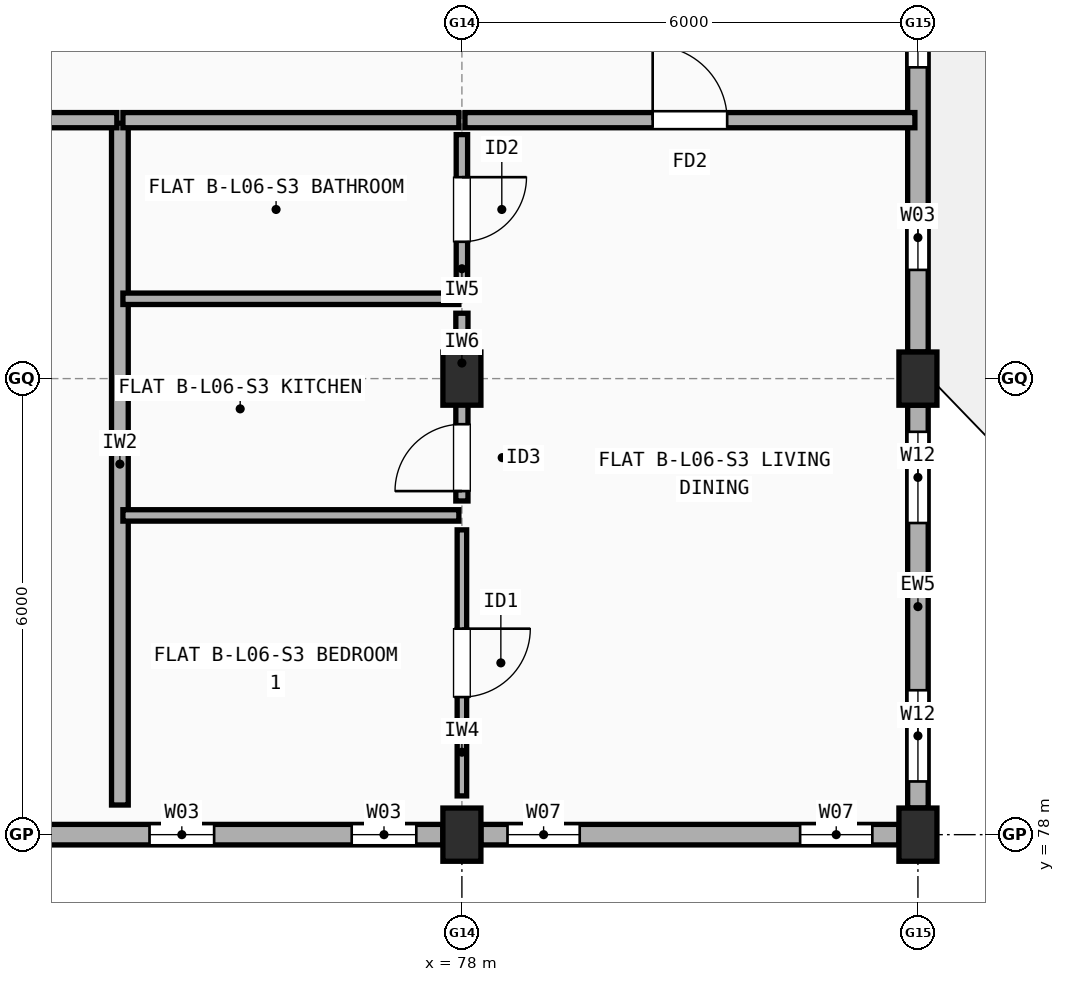
"""IFC4 building model, lengths in metres.
Left out: names, types, materials, properties, quantities, classifications, styles, units other than length and angle.
Written with IfcOpenShell. Run it as: python <this file> out.ifc"""

import sys

from ifc_helpers import new_model, si_unit, direction, frame, frame_2d, origin, origin_2d, place, context, subcontext, project, spatial, rectangle, extrude, element, fill, save


model = new_model("IFC4")
c1 = context("Model", 3, precision=1e-05, world=origin(), true_north=direction((0.0, 1.0)))
c2 = subcontext(c1, "Body", "Model", "MODEL_VIEW")
j1 = project(units=[si_unit("LENGTHUNIT", "METRE"), si_unit("PLANEANGLEUNIT", "RADIAN")], contexts=[c1])
p1 = place(None, origin())
s1 = spatial("IfcSite", under=j1, at=p1, CompositionType="ELEMENT")
p2 = place(p1, origin())
s2 = spatial("IfcBuilding", under=s1, at=p2, CompositionType="ELEMENT")
p3 = place(p2, frame((0.0, 0.0, 20.5)))
s3 = spatial("IfcBuildingStorey", under=s2, at=p3, CompositionType="ELEMENT", Elevation=20.5)
for number, where, z_axis, x_axis in (
    (1, (78.0, 78.0, 0.0), (0.0, 0.0, 1.0), (1.0, 0.0, 0.0)),
    (2, (78.0, 84.0, 0.0), (0.0, 0.0, 1.0), (1.0, 0.0, 0.0)),
    (3, (84.0, 78.0, 0.0), (0.0, 0.0, 1.0), (1.0, 0.0, 0.0)),
    (4, (84.0, 84.0, 0.0), (0.0, 0.0, 1.0), (1.0, 0.0, 0.0)),
):
    element("IfcColumn", number, at=place(p3, frame(where, z_axis=z_axis, x_axis=x_axis)), inside=s3, PredefinedType="COLUMN", context=c2, shape_type="SweptSolid", body=[
        extrude(rectangle(XDim=0.5, YDim=0.7, at=origin_2d()), origin(), (0.0, 0.0, 1.0), 2.97),
    ])
p4 = place(p3, frame((72.275, 78.0, 0.0), z_axis=(0.0, 0.0, 1.0), x_axis=(1.0, 0.0, 0.0)))
e5 = element("IfcWall", 5, at=p4, inside=s3, PredefinedType="STANDARD", context=c2, shape_type="SweptSolid", body=[
    extrude(rectangle(XDim=5.475, YDim=0.27, at=frame_2d((2.738, 0.0))), origin(), (0.0, 0.0, 1.0), 2.452),
])
p5 = place(p4, frame((1.615, 0.0, 0.9)))
e6 = element("IfcOpeningElement", 6, at=p5, cuts=e5, PredefinedType="OPENING", context=c2, shape_type="SweptSolid", body=[
    extrude(rectangle(XDim=0.85, YDim=1.25, at=frame_2d((0.425, 0.625))), frame((0.0, 0.145, 0.0), z_axis=(0.0, -1.0, 0.0), x_axis=(1.0, 0.0, 0.0)), (0.0, 0.0, 1.0), 0.29),
])
p6 = place(p4, frame((4.275, 0.0, 0.9)))
e7 = element("IfcOpeningElement", 7, at=p6, cuts=e5, PredefinedType="OPENING", context=c2, shape_type="SweptSolid", body=[
    extrude(rectangle(XDim=0.85, YDim=1.25, at=frame_2d((0.425, 0.625))), frame((0.0, 0.145, 0.0), z_axis=(0.0, -1.0, 0.0), x_axis=(1.0, 0.0, 0.0)), (0.0, 0.0, 1.0), 0.29),
])
p7 = place(p3, frame((78.25, 78.0, 0.0), z_axis=(0.0, 0.0, 1.0), x_axis=(1.0, 0.0, 0.0)))
e8 = element("IfcWall", 8, at=p7, inside=s3, PredefinedType="STANDARD", context=c2, shape_type="SweptSolid", body=[
    extrude(rectangle(XDim=5.5, YDim=0.27, at=frame_2d((2.75, 0.0))), origin(), (0.0, 0.0, 1.0), 2.452),
])
p8 = place(p7, frame((0.35, 0.0, 0.9)))
e9 = element("IfcOpeningElement", 9, at=p8, cuts=e8, PredefinedType="OPENING", context=c2, shape_type="SweptSolid", body=[
    extrude(rectangle(XDim=0.95, YDim=1.35, at=frame_2d((0.475, 0.675))), frame((0.0, 0.145, 0.0), z_axis=(0.0, -1.0, 0.0), x_axis=(1.0, 0.0, 0.0)), (0.0, 0.0, 1.0), 0.29),
])
p9 = place(p7, frame((4.2, 0.0, 0.9)))
e10 = element("IfcOpeningElement", 10, at=p9, cuts=e8, PredefinedType="OPENING", context=c2, shape_type="SweptSolid", body=[
    extrude(rectangle(XDim=0.95, YDim=1.35, at=frame_2d((0.475, 0.675))), frame((0.0, 0.145, 0.0), z_axis=(0.0, -1.0, 0.0), x_axis=(1.0, 0.0, 0.0)), (0.0, 0.0, 1.0), 0.29),
])
p10 = place(p3, frame((84.0, 78.35, 0.0), z_axis=(0.0, 0.0, 1.0), x_axis=(0.0, 1.0, 0.0)))
e11 = element("IfcWall", 11, at=p10, inside=s3, PredefinedType="STANDARD", context=c2, shape_type="SweptSolid", body=[
    extrude(rectangle(XDim=5.3, YDim=0.27, at=frame_2d((2.65, 0.0))), origin(), (0.0, 0.0, 1.0), 2.452),
])
p11 = place(p10, frame((0.35, 0.0, 0.9)))
e12 = element("IfcOpeningElement", 12, at=p11, cuts=e11, PredefinedType="OPENING", context=c2, shape_type="SweptSolid", body=[
    extrude(rectangle(XDim=1.2, YDim=1.35, at=frame_2d((0.6, 0.675))), frame((0.0, 0.145, 0.0), z_axis=(0.0, -1.0, 0.0), x_axis=(1.0, 0.0, 0.0)), (0.0, 0.0, 1.0), 0.29),
])
p12 = place(p10, frame((3.75, 0.0, 0.9)))
e13 = element("IfcOpeningElement", 13, at=p12, cuts=e11, PredefinedType="OPENING", context=c2, shape_type="SweptSolid", body=[
    extrude(rectangle(XDim=1.2, YDim=1.35, at=frame_2d((0.6, 0.675))), frame((0.0, 0.145, 0.0), z_axis=(0.0, -1.0, 0.0), x_axis=(1.0, 0.0, 0.0)), (0.0, 0.0, 1.0), 0.29),
])
p13 = place(p3, frame((84.0, 84.35, 0.0), z_axis=(0.0, 0.0, 1.0), x_axis=(0.0, 1.0, 0.0)))
e14 = element("IfcWall", 14, at=p13, inside=s3, PredefinedType="STANDARD", context=c2, shape_type="SweptSolid", body=[
    extrude(rectangle(XDim=5.3, YDim=0.27, at=frame_2d((2.65, 0.0))), origin(), (0.0, 0.0, 1.0), 2.452),
])
p14 = place(p13, frame((1.08, 0.0, 0.9)))
e15 = element("IfcOpeningElement", 15, at=p14, cuts=e14, PredefinedType="OPENING", context=c2, shape_type="SweptSolid", body=[
    extrude(rectangle(XDim=0.85, YDim=1.25, at=frame_2d((0.425, 0.625))), frame((0.0, 0.145, 0.0), z_axis=(0.0, -1.0, 0.0), x_axis=(1.0, 0.0, 0.0)), (0.0, 0.0, 1.0), 0.29),
])
p15 = place(p13, frame((3.745, 0.0, 0.9)))
e16 = element("IfcOpeningElement", 16, at=p15, cuts=e14, PredefinedType="OPENING", context=c2, shape_type="SweptSolid", body=[
    extrude(rectangle(XDim=0.9, YDim=1.3, at=frame_2d((0.45, 0.65))), frame((0.0, 0.145, 0.0), z_axis=(0.0, -1.0, 0.0), x_axis=(1.0, 0.0, 0.0)), (0.0, 0.0, 1.0), 0.29),
])
p16 = place(p3, frame((73.5, 78.39, 0.0), z_axis=(0.0, 0.0, 1.0), x_axis=(0.0, 1.0, 0.0)))
e17 = element("IfcWall", 17, at=p16, inside=s3, PredefinedType="SOLIDWALL", context=c2, shape_type="SweptSolid", body=[
    extrude(rectangle(XDim=8.97, YDim=0.22, at=frame_2d((4.485, 0.0))), origin(), (0.0, 0.0, 1.0), 2.452),
])
p17 = place(p3, frame((67.54, 87.4, 0.0), z_axis=(0.0, 0.0, 1.0), x_axis=(1.0, 0.0, 0.0)))
e18 = element("IfcWall", 18, at=p17, inside=s3, PredefinedType="SOLIDWALL", context=c2, shape_type="SweptSolid", body=[
    extrude(rectangle(XDim=5.92, YDim=0.2, at=frame_2d((2.96, 0.0))), origin(), (0.0, 0.0, 1.0), 2.548),
])
p18 = place(p17, frame((2.46, 0.0, 0.0)))
e19 = element("IfcOpeningElement", 19, at=p18, cuts=e18, PredefinedType="OPENING", context=c2, shape_type="SweptSolid", body=[
    extrude(rectangle(XDim=1.0, YDim=2.15, at=frame_2d((0.5, 1.075))), frame((0.0, 0.11, 0.0), z_axis=(0.0, -1.0, 0.0), x_axis=(1.0, 0.0, 0.0)), (0.0, 0.0, 1.0), 0.22),
])
p19 = place(p3, frame((73.54, 87.4, 0.0), z_axis=(0.0, 0.0, 1.0), x_axis=(1.0, 0.0, 0.0)))
e20 = element("IfcWall", 20, at=p19, inside=s3, PredefinedType="SOLIDWALL", context=c2, shape_type="SweptSolid", body=[
    extrude(rectangle(XDim=4.42, YDim=0.2, at=frame_2d((2.21, 0.0))), origin(), (0.0, 0.0, 1.0), 2.452),
])
p20 = place(p3, frame((78.04, 87.4, 0.0), z_axis=(0.0, 0.0, 1.0), x_axis=(1.0, 0.0, 0.0)))
e21 = element("IfcWall", 21, at=p20, inside=s3, PredefinedType="SOLIDWALL", context=c2, shape_type="SweptSolid", body=[
    extrude(rectangle(XDim=5.92, YDim=0.2, at=frame_2d((2.96, 0.0))), origin(), (0.0, 0.0, 1.0), 2.452),
])
p21 = place(p20, frame((2.47, 0.0, 0.0)))
e22 = element("IfcOpeningElement", 22, at=p21, cuts=e21, PredefinedType="OPENING", context=c2, shape_type="SweptSolid", body=[
    extrude(rectangle(XDim=0.98, YDim=2.15, at=frame_2d((0.49, 1.075))), frame((0.0, 0.11, 0.0), z_axis=(0.0, -1.0, 0.0), x_axis=(1.0, 0.0, 0.0)), (0.0, 0.0, 1.0), 0.22),
])
p22 = place(p3, frame((78.0, 78.51, 0.0), z_axis=(0.0, 0.0, 1.0), x_axis=(0.0, 1.0, 0.0)))
e23 = element("IfcWall", 23, at=p22, inside=s3, PredefinedType="PARTITIONING", context=c2, shape_type="SweptSolid", body=[
    extrude(rectangle(XDim=3.5, YDim=0.125, at=frame_2d((1.75, 0.0))), origin(), (0.0, 0.0, 1.0), 2.452),
])
p23 = place(p22, frame((1.3, 0.0, 0.0)))
e24 = element("IfcOpeningElement", 24, at=p23, cuts=e23, PredefinedType="OPENING", context=c2, shape_type="SweptSolid", body=[
    extrude(rectangle(XDim=0.9, YDim=2.1, at=frame_2d((0.45, 1.05))), frame((0.0, 0.073, 0.0), z_axis=(0.0, -1.0, 0.0), x_axis=(1.0, 0.0, 0.0)), (0.0, 0.0, 1.0), 0.145),
])
p24 = place(p3, frame((78.0, 82.39, 0.0), z_axis=(0.0, 0.0, 1.0), x_axis=(0.0, 1.0, 0.0)))
e25 = element("IfcWall", 25, at=p24, inside=s3, PredefinedType="PLUMBINGWALL", context=c2, shape_type="SweptSolid", body=[
    extrude(rectangle(XDim=2.47, YDim=0.16, at=frame_2d((1.235, 0.0))), origin(), (0.0, 0.0, 1.0), 2.452),
])
p25 = place(p24, frame((0.13, 0.0, 0.0)))
e26 = element("IfcOpeningElement", 26, at=p25, cuts=e25, PredefinedType="OPENING", context=c2, shape_type="SweptSolid", body=[
    extrude(rectangle(XDim=0.88, YDim=2.1, at=frame_2d((0.44, 1.05))), frame((0.0, 0.09, 0.0), z_axis=(0.0, -1.0, 0.0), x_axis=(1.0, 0.0, 0.0)), (0.0, 0.0, 1.0), 0.18),
])
p26 = place(p3, frame((78.0, 85.24, 0.0), z_axis=(0.0, 0.0, 1.0), x_axis=(0.0, 1.0, 0.0)))
e27 = element("IfcWall", 27, at=p26, inside=s3, PredefinedType="PARTITIONING", context=c2, shape_type="SweptSolid", body=[
    extrude(rectangle(XDim=1.97, YDim=0.15, at=frame_2d((0.985, 0.0))), origin(), (0.0, 0.0, 1.0), 2.452),
])
p27 = place(p26, frame((0.56, 0.0, 0.0)))
e28 = element("IfcOpeningElement", 28, at=p27, cuts=e27, PredefinedType="OPENING", context=c2, shape_type="SweptSolid", body=[
    extrude(rectangle(XDim=0.85, YDim=2.1, at=frame_2d((0.425, 1.05))), frame((0.0, 0.085, 0.0), z_axis=(0.0, -1.0, 0.0), x_axis=(1.0, 0.0, 0.0)), (0.0, 0.0, 1.0), 0.17),
])
for number, where, z_axis, x_axis in (
    (29, (73.54, 82.2, 0.0), (0.0, 0.0, 1.0), (1.0, 0.0, 0.0)),
    (30, (73.54, 85.05, 0.0), (0.0, 0.0, 1.0), (1.0, 0.0, 0.0)),
):
    element("IfcWall", number, at=place(p3, frame(where, z_axis=z_axis, x_axis=x_axis)), inside=s3, PredefinedType="PARTITIONING", context=c2, shape_type="SweptSolid", body=[
        extrude(rectangle(XDim=4.42, YDim=0.15, at=frame_2d((2.21, 0.0))), origin(), (0.0, 0.0, 1.0), 2.452),
    ])
p28 = place(p5, origin())
e31 = element("IfcWindow", 31, at=p28, inside=s3, PartitioningType="SINGLE_PANEL", PredefinedType="WINDOW", context=c2, shape_type="SweptSolid", body=[
    extrude(rectangle(XDim=0.85, YDim=1.25, at=frame_2d((0.425, 0.625))), frame((0.0, 0.03, 0.0), z_axis=(0.0, -1.0, 0.0), x_axis=(1.0, 0.0, 0.0)), (0.0, 0.0, 1.0), 0.06),
])
fill(e6, e31)
p29 = place(p6, origin())
e32 = element("IfcWindow", 32, at=p29, inside=s3, PartitioningType="SINGLE_PANEL", PredefinedType="WINDOW", context=c2, shape_type="SweptSolid", body=[
    extrude(rectangle(XDim=0.85, YDim=1.25, at=frame_2d((0.425, 0.625))), frame((0.0, 0.03, 0.0), z_axis=(0.0, -1.0, 0.0), x_axis=(1.0, 0.0, 0.0)), (0.0, 0.0, 1.0), 0.06),
])
fill(e7, e32)
p30 = place(p8, origin())
e33 = element("IfcWindow", 33, at=p30, inside=s3, PartitioningType="SINGLE_PANEL", PredefinedType="WINDOW", context=c2, shape_type="SweptSolid", body=[
    extrude(rectangle(XDim=0.95, YDim=1.35, at=frame_2d((0.475, 0.675))), frame((0.0, 0.03, 0.0), z_axis=(0.0, -1.0, 0.0), x_axis=(1.0, 0.0, 0.0)), (0.0, 0.0, 1.0), 0.06),
])
fill(e9, e33)
p31 = place(p9, origin())
e34 = element("IfcWindow", 34, at=p31, inside=s3, PartitioningType="SINGLE_PANEL", PredefinedType="WINDOW", context=c2, shape_type="SweptSolid", body=[
    extrude(rectangle(XDim=0.95, YDim=1.35, at=frame_2d((0.475, 0.675))), frame((0.0, 0.03, 0.0), z_axis=(0.0, -1.0, 0.0), x_axis=(1.0, 0.0, 0.0)), (0.0, 0.0, 1.0), 0.06),
])
fill(e10, e34)
p32 = place(p11, origin())
e35 = element("IfcWindow", 35, at=p32, inside=s3, PartitioningType="SINGLE_PANEL", PredefinedType="WINDOW", context=c2, shape_type="SweptSolid", body=[
    extrude(rectangle(XDim=1.2, YDim=1.35, at=frame_2d((0.6, 0.675))), frame((0.0, 0.03, 0.0), z_axis=(0.0, -1.0, 0.0), x_axis=(1.0, 0.0, 0.0)), (0.0, 0.0, 1.0), 0.06),
])
fill(e12, e35)
p33 = place(p12, origin())
e36 = element("IfcWindow", 36, at=p33, inside=s3, PartitioningType="SINGLE_PANEL", PredefinedType="WINDOW", context=c2, shape_type="SweptSolid", body=[
    extrude(rectangle(XDim=1.2, YDim=1.35, at=frame_2d((0.6, 0.675))), frame((0.0, 0.03, 0.0), z_axis=(0.0, -1.0, 0.0), x_axis=(1.0, 0.0, 0.0)), (0.0, 0.0, 1.0), 0.06),
])
fill(e13, e36)
p34 = place(p14, origin())
e37 = element("IfcWindow", 37, at=p34, inside=s3, PartitioningType="SINGLE_PANEL", PredefinedType="WINDOW", context=c2, shape_type="SweptSolid", body=[
    extrude(rectangle(XDim=0.85, YDim=1.25, at=frame_2d((0.425, 0.625))), frame((0.0, 0.03, 0.0), z_axis=(0.0, -1.0, 0.0), x_axis=(1.0, 0.0, 0.0)), (0.0, 0.0, 1.0), 0.06),
])
fill(e15, e37)
p35 = place(p15, origin())
e38 = element("IfcWindow", 38, at=p35, inside=s3, PartitioningType="SINGLE_PANEL", PredefinedType="WINDOW", context=c2, shape_type="SweptSolid", body=[
    extrude(rectangle(XDim=0.9, YDim=1.3, at=frame_2d((0.45, 0.65))), frame((0.0, 0.03, 0.0), z_axis=(0.0, -1.0, 0.0), x_axis=(1.0, 0.0, 0.0)), (0.0, 0.0, 1.0), 0.06),
])
fill(e16, e38)
p36 = place(p21, origin())
e39 = element("IfcDoor", 39, at=p36, inside=s3, OperationType="SINGLE_SWING_LEFT", PredefinedType="DOOR", context=c2, shape_type="SweptSolid", body=[
    extrude(rectangle(XDim=0.98, YDim=2.15, at=frame_2d((0.49, 1.075))), frame((0.0, 0.025, 0.0), z_axis=(0.0, -1.0, 0.0), x_axis=(1.0, 0.0, 0.0)), (0.0, 0.0, 1.0), 0.05),
])
fill(e22, e39)
p37 = place(p23, origin())
e40 = element("IfcDoor", 40, at=p37, inside=s3, OperationType="SINGLE_SWING_RIGHT", PredefinedType="DOOR", context=c2, shape_type="SweptSolid", body=[
    extrude(rectangle(XDim=0.9, YDim=2.1, at=frame_2d((0.45, 1.05))), frame((0.0, 0.025, 0.0), z_axis=(0.0, -1.0, 0.0), x_axis=(1.0, 0.0, 0.0)), (0.0, 0.0, 1.0), 0.05),
])
fill(e24, e40)
p38 = place(p25, origin())
e41 = element("IfcDoor", 41, at=p38, inside=s3, OperationType="SINGLE_SWING_LEFT", PredefinedType="DOOR", context=c2, shape_type="SweptSolid", body=[
    extrude(rectangle(XDim=0.88, YDim=2.1, at=frame_2d((0.44, 1.05))), frame((0.0, 0.025, 0.0), z_axis=(0.0, -1.0, 0.0), x_axis=(1.0, 0.0, 0.0)), (0.0, 0.0, 1.0), 0.05),
])
fill(e26, e41)
p39 = place(p27, origin())
e42 = element("IfcDoor", 42, at=p39, inside=s3, OperationType="SINGLE_SWING_RIGHT", PredefinedType="DOOR", context=c2, shape_type="SweptSolid", body=[
    extrude(rectangle(XDim=0.85, YDim=2.1, at=frame_2d((0.425, 1.05))), frame((0.0, 0.025, 0.0), z_axis=(0.0, -1.0, 0.0), x_axis=(1.0, 0.0, 0.0)), (0.0, 0.0, 1.0), 0.05),
])
fill(e28, e42)
save(model, sys.argv[1])
